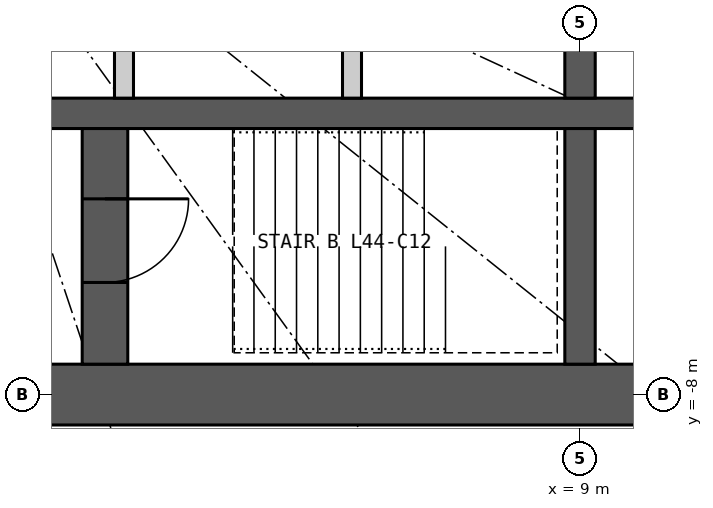
"""IFC4 building model, lengths in metres.
Left out: names, types, materials, properties, quantities, classifications, styles, units other than length and angle.
Written with IfcOpenShell. Run it as: python <this file> out.ifc"""

import sys

from ifc_helpers import new_model, si_unit, direction, frame, frame_2d, origin, place, context, subcontext, project, spatial, rectangle, extrude, element, fill, save


model = new_model("IFC4")
c1 = context("Model", 3, precision=1e-05, world=origin(), true_north=direction((0.0, 1.0)))
c2 = subcontext(c1, "Body", "Model", "MODEL_VIEW")
j1 = project(units=[si_unit("LENGTHUNIT", "METRE"), si_unit("PLANEANGLEUNIT", "RADIAN")], contexts=[c1])
p1 = place(None, origin())
s1 = spatial("IfcSite", under=j1, at=p1, CompositionType="ELEMENT")
p2 = place(p1, origin())
s2 = spatial("IfcBuilding", under=s1, at=p2, CompositionType="ELEMENT")
p3 = place(p2, frame((0.0, 0.0, 166.5)))
s3 = spatial("IfcBuildingStorey", under=s2, at=p3, CompositionType="ELEMENT", Elevation=166.5)
p4 = place(p3, frame((12.4, -8.0, 0.0), z_axis=(0.0, 0.0, 1.0), x_axis=(-1.0, 0.0, 0.0)))
e1 = element("IfcWall", 1, at=p4, inside=s3, PredefinedType="SHEAR", context=c2, shape_type="SweptSolid", body=[
    extrude(rectangle(XDim=24.8, YDim=0.8, at=frame_2d((12.4, 0.0))), origin(), (0.0, 0.0, 1.0), 3.3),
])
p5 = place(p4, frame((11.1, 0.0, 0.0)))
e2 = element("IfcOpeningElement", 2, at=p5, cuts=e1, PredefinedType="OPENING", context=c2, shape_type="SweptSolid", body=[
    extrude(rectangle(XDim=1.2, YDim=2.2, at=frame_2d((0.6, 1.1))), frame((0.0, 0.41, 0.0), z_axis=(0.0, -1.0, 0.0), x_axis=(1.0, 0.0, 0.0)), (0.0, 0.0, 1.0), 0.82),
])
p6 = place(p4, frame((18.7, 0.0, 0.0)))
e3 = element("IfcOpeningElement", 3, at=p6, cuts=e1, PredefinedType="OPENING", context=c2, shape_type="SweptSolid", body=[
    extrude(rectangle(XDim=0.9, YDim=2.2, at=frame_2d((0.45, 1.1))), frame((0.0, 0.41, 0.0), z_axis=(0.0, -1.0, 0.0), x_axis=(1.0, 0.0, 0.0)), (0.0, 0.0, 1.0), 0.82),
])
p7 = place(p3, frame((-11.6, -4.3, 0.0), z_axis=(0.0, 0.0, 1.0), x_axis=(1.0, 0.0, 0.0)))
e4 = element("IfcWall", 4, at=p7, inside=s3, PredefinedType="SHEAR", context=c2, shape_type="SweptSolid", body=[
    extrude(rectangle(XDim=23.2, YDim=0.4, at=frame_2d((11.6, 0.0))), origin(), (0.0, 0.0, 1.0), 3.3),
])
p8 = place(p3, frame((9.0, -4.1, 0.0), z_axis=(0.0, 0.0, 1.0), x_axis=(0.0, 1.0, 0.0)))
e5 = element("IfcWall", 5, at=p8, inside=s3, PredefinedType="SHEAR", context=c2, shape_type="SweptSolid", body=[
    extrude(rectangle(XDim=2.35, YDim=0.4, at=frame_2d((1.175, 0.0))), origin(), (0.0, 0.0, 1.0), 3.3),
])
p9 = place(p3, frame((9.0, -7.6, 0.0), z_axis=(0.0, 0.0, 1.0), x_axis=(0.0, 1.0, 0.0)))
e6 = element("IfcWall", 6, at=p9, inside=s3, PredefinedType="SHEAR", context=c2, shape_type="SweptSolid", body=[
    extrude(rectangle(XDim=3.1, YDim=0.4, at=frame_2d((1.55, 0.0))), origin(), (0.0, 0.0, 1.0), 3.3),
])
p10 = place(p3, frame((2.75, -7.6, 0.0), z_axis=(0.0, 0.0, 1.0), x_axis=(0.0, 1.0, 0.0)))
e7 = element("IfcWall", 7, at=p10, inside=s3, PredefinedType="SHEAR", context=c2, shape_type="SweptSolid", body=[
    extrude(rectangle(XDim=3.1, YDim=0.6, at=frame_2d((1.55, 0.0))), origin(), (0.0, 0.0, 1.0), 3.3),
])
p11 = place(p10, frame((1.075, 0.0, 0.0)))
e8 = element("IfcOpeningElement", 8, at=p11, cuts=e7, PredefinedType="OPENING", context=c2, shape_type="SweptSolid", body=[
    extrude(rectangle(XDim=1.1, YDim=2.2, at=frame_2d((0.55, 1.1))), frame((0.0, 0.31, 0.0), z_axis=(0.0, -1.0, 0.0), x_axis=(1.0, 0.0, 0.0)), (0.0, 0.0, 1.0), 0.62),
])
for number, where, z_axis, x_axis in (
    (9, (3.0, -4.1, 0.0), (0.0, 0.0, 1.0), (0.0, 1.0, 0.0)),
    (10, (6.0, -4.1, 0.0), (0.0, 0.0, 1.0), (0.0, 1.0, 0.0)),
):
    element("IfcWall", number, at=place(p3, frame(where, z_axis=z_axis, x_axis=x_axis)), inside=s3, PredefinedType="PARTITIONING", context=c2, shape_type="SweptSolid", body=[
        extrude(rectangle(XDim=2.35, YDim=0.25, at=frame_2d((1.175, 0.0))), origin(), (0.0, 0.0, 1.0), 3.3),
    ])
p12 = place(p11, origin())
e11 = element("IfcDoor", 11, at=p12, inside=s3, OperationType="SINGLE_SWING_RIGHT", PredefinedType="DOOR", context=c2, shape_type="SweptSolid", body=[
    extrude(rectangle(XDim=1.1, YDim=2.2, at=frame_2d((0.55, 1.1))), frame((0.0, 0.025, 0.0), z_axis=(0.0, -1.0, 0.0), x_axis=(1.0, 0.0, 0.0)), (0.0, 0.0, 1.0), 0.05),
])
fill(e8, e11)
save(model, sys.argv[1])
